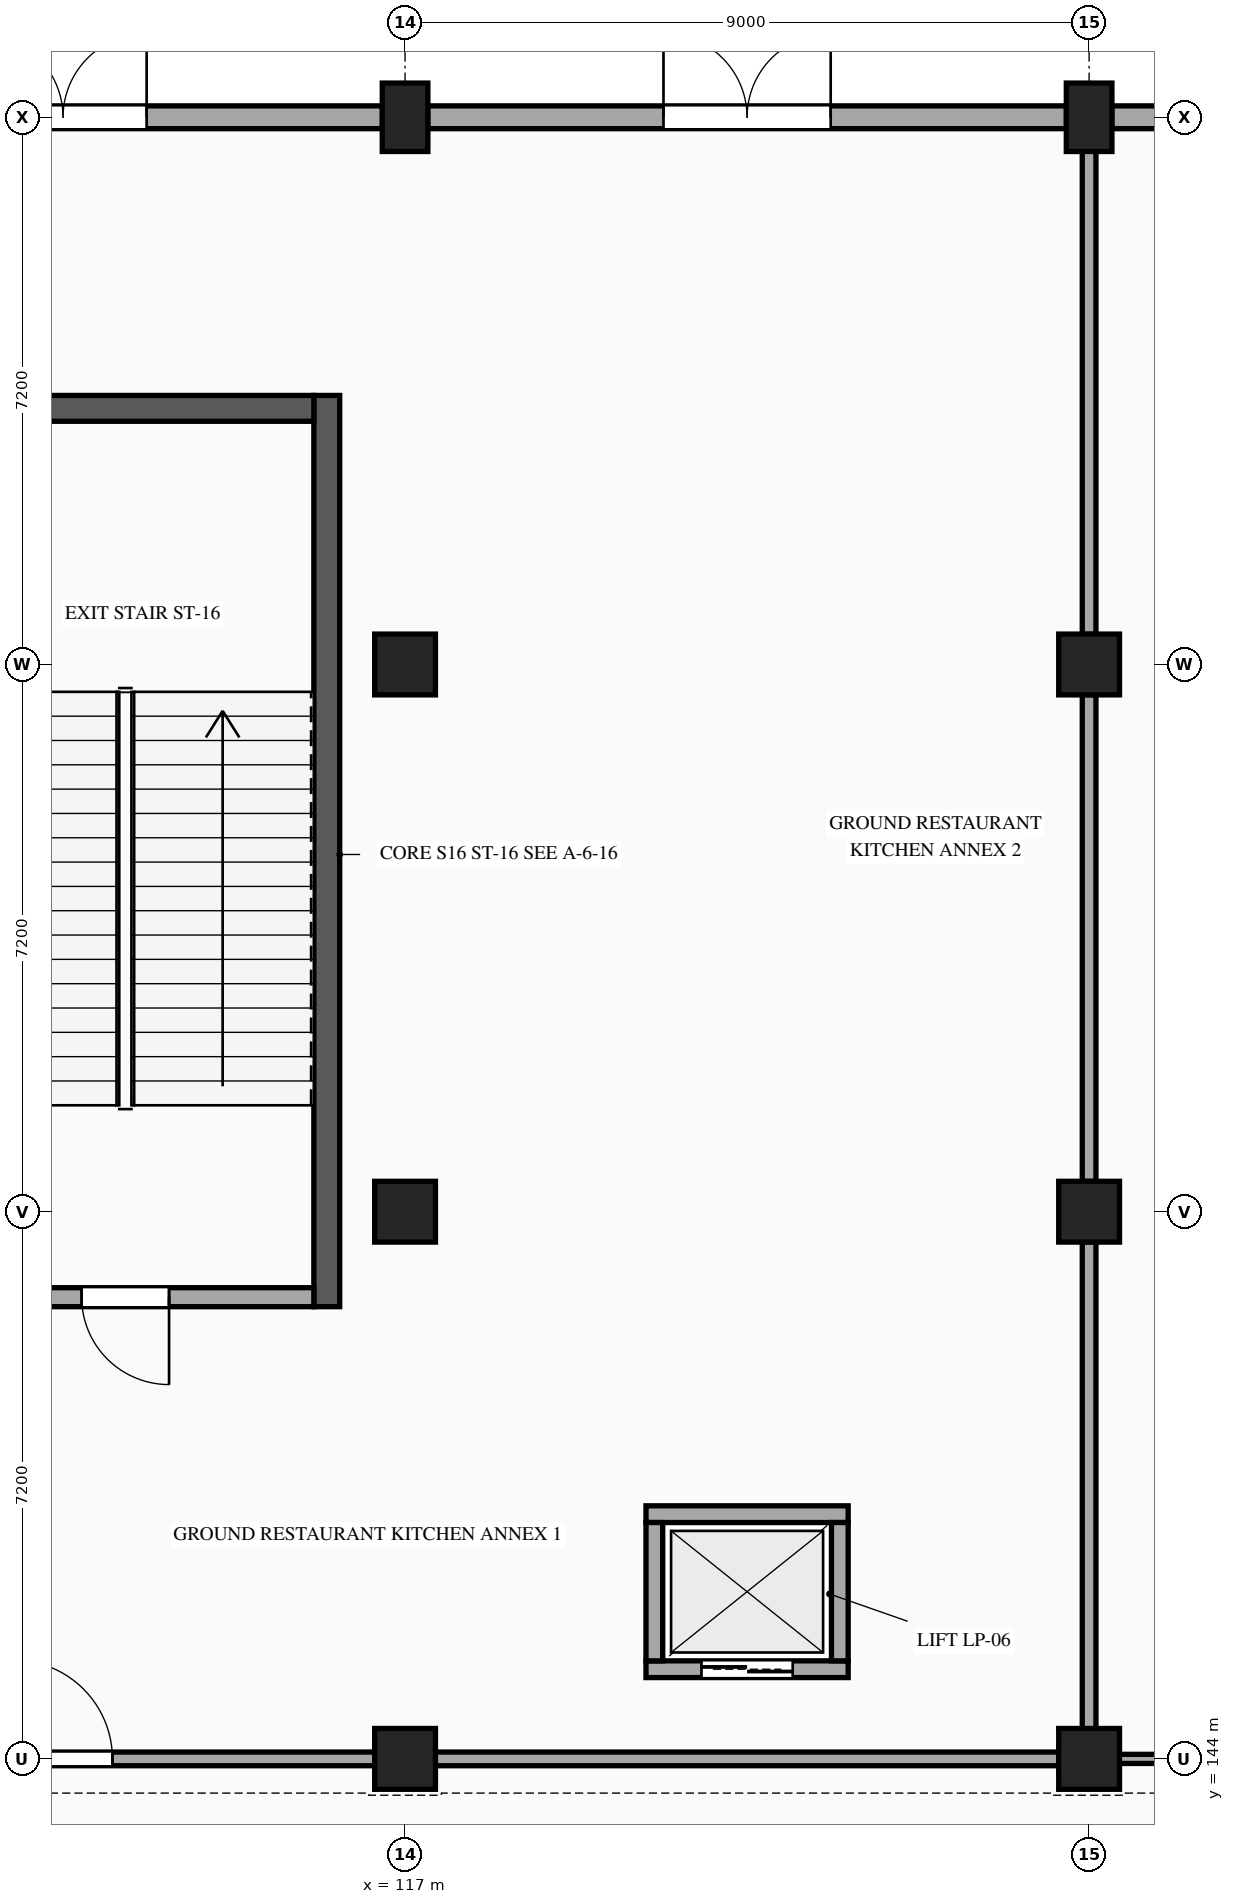
"""IFC4 building model, lengths in metres.
Left out: names, types, materials, properties, quantities, classifications, styles, units other than length and angle.
Written with IfcOpenShell. Run it as: python <this file> out.ifc"""

import sys

from ifc_helpers import new_model, si_unit, direction, frame, frame_2d, origin, origin_2d, place, context, subcontext, project, spatial, rectangle, extrude, element, fill, save


model = new_model("IFC4")
c1 = context("Model", 3, precision=1e-05, world=origin(), true_north=direction((0.0, 1.0)))
c2 = subcontext(c1, "Body", "Model", "MODEL_VIEW")
j1 = project(units=[si_unit("LENGTHUNIT", "METRE"), si_unit("PLANEANGLEUNIT", "RADIAN")], contexts=[c1])
p1 = place(None, origin())
s1 = spatial("IfcSite", under=j1, at=p1, CompositionType="ELEMENT")
p2 = place(p1, origin())
s2 = spatial("IfcBuilding", under=s1, at=p2, CompositionType="ELEMENT")
p3 = place(p2, origin())
s3 = spatial("IfcBuildingStorey", under=s2, at=p3, CompositionType="ELEMENT", Elevation=0.0)
for number, where, z_axis, x_axis in (
    (1, (117.0, 144.0, 0.0), (0.0, 0.0, 1.0), (1.0, 0.0, 0.0)),
    (2, (117.0, 151.2, 0.0), (0.0, 0.0, 1.0), (1.0, 0.0, 0.0)),
    (3, (117.0, 158.4, 0.0), (0.0, 0.0, 1.0), (1.0, 0.0, 0.0)),
):
    element("IfcColumn", number, at=place(p3, frame(where, z_axis=z_axis, x_axis=x_axis)), inside=s3, PredefinedType="COLUMN", context=c2, shape_type="SweptSolid", body=[
        extrude(rectangle(XDim=0.8, YDim=0.8, at=origin_2d()), origin(), (0.0, 0.0, 1.0), 5.4),
    ])
p4 = place(p3, frame((117.0, 165.6, 0.0), z_axis=(0.0, 0.0, 1.0), x_axis=(1.0, 0.0, 0.0)))
e4 = element("IfcColumn", 4, at=p4, inside=s3, PredefinedType="COLUMN", context=c2, shape_type="SweptSolid", body=[
    extrude(rectangle(XDim=0.6, YDim=0.9, at=origin_2d()), origin(), (0.0, 0.0, 1.0), 5.4),
])
for number, where, z_axis, x_axis in (
    (5, (126.0, 144.0, 0.0), (0.0, 0.0, 1.0), (1.0, 0.0, 0.0)),
    (6, (126.0, 151.2, 0.0), (0.0, 0.0, 1.0), (1.0, 0.0, 0.0)),
    (7, (126.0, 158.4, 0.0), (0.0, 0.0, 1.0), (1.0, 0.0, 0.0)),
):
    element("IfcColumn", number, at=place(p3, frame(where, z_axis=z_axis, x_axis=x_axis)), inside=s3, PredefinedType="COLUMN", context=c2, shape_type="SweptSolid", body=[
        extrude(rectangle(XDim=0.8, YDim=0.8, at=origin_2d()), origin(), (0.0, 0.0, 1.0), 5.4),
    ])
p5 = place(p3, frame((126.0, 165.6, 0.0), z_axis=(0.0, 0.0, 1.0), x_axis=(1.0, 0.0, 0.0)))
e8 = element("IfcColumn", 8, at=p5, inside=s3, PredefinedType="COLUMN", context=c2, shape_type="SweptSolid", body=[
    extrude(rectangle(XDim=0.6, YDim=0.9, at=origin_2d()), origin(), (0.0, 0.0, 1.0), 5.4),
])
p6 = place(p3, frame((115.97, 161.94, 0.0), z_axis=(0.0, 0.0, 1.0), x_axis=(0.0, -1.0, 0.0)))
e9 = element("IfcWall", 9, at=p6, inside=s3, PredefinedType="SHEAR", context=c2, shape_type="SweptSolid", body=[
    extrude(rectangle(XDim=11.99, YDim=0.34, at=frame_2d((5.995, 0.0))), origin(), (0.0, 0.0, 1.0), 5.12),
])
p7 = place(p3, frame((110.84, 161.77, 0.0), z_axis=(0.0, 0.0, 1.0), x_axis=(1.0, 0.0, 0.0)))
e10 = element("IfcWall", 10, at=p7, inside=s3, PredefinedType="SHEAR", context=c2, shape_type="SweptSolid", body=[
    extrude(rectangle(XDim=4.96, YDim=0.34, at=frame_2d((2.48, 0.0))), origin(), (0.0, 0.0, 1.0), 5.12),
])
p8 = place(p3, frame((108.298, 165.6, 0.0), z_axis=(0.0, 0.0, 1.0), x_axis=(1.0, 0.0, 0.0)))
e11 = element("IfcWall", 11, at=p8, inside=s3, PredefinedType="STANDARD", context=c2, shape_type="SweptSolid", body=[
    extrude(rectangle(XDim=8.404, YDim=0.3, at=frame_2d((4.202, 0.0))), origin(), (0.0, 0.0, 1.0), 4.747),
])
p9 = place(p8, frame((3.102, 0.0, 0.0)))
e12 = element("IfcOpeningElement", 12, at=p9, cuts=e11, PredefinedType="OPENING", context=c2, shape_type="SweptSolid", body=[
    extrude(rectangle(XDim=2.2, YDim=2.4, at=frame_2d((1.1, 1.2))), frame((0.0, 0.16, 0.0), z_axis=(0.0, -1.0, 0.0), x_axis=(1.0, 0.0, 0.0)), (0.0, 0.0, 1.0), 0.32),
])
p10 = place(p3, frame((117.298, 165.6, 0.0), z_axis=(0.0, 0.0, 1.0), x_axis=(1.0, 0.0, 0.0)))
e13 = element("IfcWall", 13, at=p10, inside=s3, PredefinedType="STANDARD", context=c2, shape_type="SweptSolid", body=[
    extrude(rectangle(XDim=8.404, YDim=0.3, at=frame_2d((4.202, 0.0))), origin(), (0.0, 0.0, 1.0), 4.747),
])
p11 = place(p10, frame((3.102, 0.0, 0.0)))
e14 = element("IfcOpeningElement", 14, at=p11, cuts=e13, PredefinedType="OPENING", context=c2, shape_type="SweptSolid", body=[
    extrude(rectangle(XDim=2.2, YDim=2.4, at=frame_2d((1.1, 1.2))), frame((0.0, 0.16, 0.0), z_axis=(0.0, -1.0, 0.0), x_axis=(1.0, 0.0, 0.0)), (0.0, 0.0, 1.0), 0.32),
])
p12 = place(p3, frame((126.298, 165.6, 0.0), z_axis=(0.0, 0.0, 1.0), x_axis=(1.0, 0.0, 0.0)))
e15 = element("IfcWall", 15, at=p12, inside=s3, PredefinedType="STANDARD", context=c2, shape_type="SweptSolid", body=[
    extrude(rectangle(XDim=8.404, YDim=0.3, at=frame_2d((4.202, 0.0))), origin(), (0.0, 0.0, 1.0), 4.747),
])
p13 = place(p12, frame((3.102, 0.0, 0.0)))
e16 = element("IfcOpeningElement", 16, at=p13, cuts=e15, PredefinedType="OPENING", context=c2, shape_type="SweptSolid", body=[
    extrude(rectangle(XDim=2.2, YDim=2.4, at=frame_2d((1.1, 1.2))), frame((0.0, 0.16, 0.0), z_axis=(0.0, -1.0, 0.0), x_axis=(1.0, 0.0, 0.0)), (0.0, 0.0, 1.0), 0.32),
])
p14 = place(p3, frame((120.17, 145.18, 0.0), z_axis=(0.0, 0.0, 1.0), x_axis=(1.0, 0.0, 0.0)))
e17 = element("IfcWall", 17, at=p14, inside=s3, PredefinedType="STANDARD", context=c2, shape_type="SweptSolid", body=[
    extrude(rectangle(XDim=2.66, YDim=0.22, at=frame_2d((1.33, 0.0))), origin(), (0.0, 0.0, 1.0), 5.08),
])
p15 = place(p14, frame((0.73, 0.0, 0.0)))
e18 = element("IfcOpeningElement", 18, at=p15, cuts=e17, PredefinedType="OPENING", context=c2, shape_type="SweptSolid", body=[
    extrude(rectangle(XDim=1.2, YDim=2.2, at=frame_2d((0.6, 1.1))), frame((0.0, 0.12, 0.0), z_axis=(0.0, -1.0, 0.0), x_axis=(1.0, 0.0, 0.0)), (0.0, 0.0, 1.0), 0.24),
])
p16 = place(p3, frame((122.83, 147.22, 0.0), z_axis=(0.0, 0.0, 1.0), x_axis=(-1.0, 0.0, 0.0)))
e19 = element("IfcWall", 19, at=p16, inside=s3, PredefinedType="STANDARD", context=c2, shape_type="SweptSolid", body=[
    extrude(rectangle(XDim=2.66, YDim=0.22, at=frame_2d((1.33, 0.0))), origin(), (0.0, 0.0, 1.0), 5.08),
])
for number, where, z_axis, x_axis in (
    (20, (120.28, 147.11, 0.0), (0.0, 0.0, 1.0), (0.0, -1.0, 0.0)),
    (21, (122.72, 145.29, 0.0), (0.0, 0.0, 1.0), (0.0, 1.0, 0.0)),
):
    element("IfcWall", number, at=place(p3, frame(where, z_axis=z_axis, x_axis=x_axis)), inside=s3, PredefinedType="STANDARD", context=c2, shape_type="SweptSolid", body=[
        extrude(rectangle(XDim=1.82, YDim=0.22, at=frame_2d((0.91, 0.0))), origin(), (0.0, 0.0, 1.0), 5.08),
    ])
p17 = place(p3, frame((115.8, 150.075, 0.0), z_axis=(0.0, 0.0, 1.0), x_axis=(-1.0, 0.0, 0.0)))
e22 = element("IfcWall", 22, at=p17, inside=s3, PredefinedType="STANDARD", context=c2, shape_type="SweptSolid", body=[
    extrude(rectangle(XDim=4.96, YDim=0.25, at=frame_2d((2.48, 0.0))), origin(), (0.0, 0.0, 1.0), 5.08),
])
p18 = place(p17, frame((1.905, 0.0, 0.0)))
e23 = element("IfcOpeningElement", 23, at=p18, cuts=e22, PredefinedType="OPENING", context=c2, shape_type="SweptSolid", body=[
    extrude(rectangle(XDim=1.15, YDim=2.2, at=frame_2d((0.575, 1.1))), frame((0.0, 0.135, 0.0), z_axis=(0.0, -1.0, 0.0), x_axis=(1.0, 0.0, 0.0)), (0.0, 0.0, 1.0), 0.27),
])
p19 = place(p3, frame((108.398, 144.0, 0.0), z_axis=(0.0, 0.0, 1.0), x_axis=(1.0, 0.0, 0.0)))
e24 = element("IfcWall", 24, at=p19, inside=s3, PredefinedType="PARTITIONING", context=c2, shape_type="SweptSolid", body=[
    extrude(rectangle(XDim=8.204, YDim=0.18, at=frame_2d((4.102, 0.0))), origin(), (0.0, 0.0, 1.0), 4.424),
])
p20 = place(p19, frame((3.452, 0.0, 0.0)))
e25 = element("IfcOpeningElement", 25, at=p20, cuts=e24, PredefinedType="OPENING", context=c2, shape_type="SweptSolid", body=[
    extrude(rectangle(XDim=1.3, YDim=2.2, at=frame_2d((0.65, 1.1))), frame((0.0, 0.1, 0.0), z_axis=(0.0, -1.0, 0.0), x_axis=(1.0, 0.0, 0.0)), (0.0, 0.0, 1.0), 0.2),
])
p21 = place(p3, frame((117.398, 144.0, 0.0), z_axis=(0.0, 0.0, 1.0), x_axis=(1.0, 0.0, 0.0)))
e26 = element("IfcWall", 26, at=p21, inside=s3, PredefinedType="PARTITIONING", context=c2, shape_type="SweptSolid", body=[
    extrude(rectangle(XDim=8.204, YDim=0.18, at=frame_2d((4.102, 0.0))), origin(), (0.0, 0.0, 1.0), 4.424),
])
p22 = place(p3, frame((126.398, 144.0, 0.0), z_axis=(0.0, 0.0, 1.0), x_axis=(1.0, 0.0, 0.0)))
e27 = element("IfcWall", 27, at=p22, inside=s3, PredefinedType="PARTITIONING", context=c2, shape_type="SweptSolid", body=[
    extrude(rectangle(XDim=8.204, YDim=0.12, at=frame_2d((4.102, 0.0))), origin(), (0.0, 0.0, 1.0), 4.424),
])
for number, where, z_axis, x_axis in (
    (28, (126.0, 144.398, 0.0), (0.0, 0.0, 1.0), (0.0, 1.0, 0.0)),
    (29, (126.0, 151.598, 0.0), (0.0, 0.0, 1.0), (0.0, 1.0, 0.0)),
):
    element("IfcWall", number, at=place(p3, frame(where, z_axis=z_axis, x_axis=x_axis)), inside=s3, PredefinedType="PARTITIONING", context=c2, shape_type="SweptSolid", body=[
        extrude(rectangle(XDim=6.404, YDim=0.18, at=frame_2d((3.202, 0.0))), origin(), (0.0, 0.0, 1.0), 4.437),
    ])
p23 = place(p3, frame((126.0, 158.798, 0.0), z_axis=(0.0, 0.0, 1.0), x_axis=(0.0, 1.0, 0.0)))
e30 = element("IfcWall", 30, at=p23, inside=s3, PredefinedType="PARTITIONING", context=c2, shape_type="SweptSolid", body=[
    extrude(rectangle(XDim=6.354, YDim=0.18, at=frame_2d((3.177, 0.0))), origin(), (0.0, 0.0, 1.0), 4.437),
])
p24 = place(p9, origin())
e31 = element("IfcDoor", 31, at=p24, inside=s3, OperationType="DOUBLE_DOOR_SINGLE_SWING", PredefinedType="DOOR", context=c2, shape_type="SweptSolid", body=[
    extrude(rectangle(XDim=2.2, YDim=2.4, at=frame_2d((1.1, 1.2))), frame((0.0, 0.025, 0.0), z_axis=(0.0, -1.0, 0.0), x_axis=(1.0, 0.0, 0.0)), (0.0, 0.0, 1.0), 0.05),
])
fill(e12, e31)
p25 = place(p11, origin())
e32 = element("IfcDoor", 32, at=p25, inside=s3, OperationType="DOUBLE_DOOR_SINGLE_SWING", PredefinedType="DOOR", context=c2, shape_type="SweptSolid", body=[
    extrude(rectangle(XDim=2.2, YDim=2.4, at=frame_2d((1.1, 1.2))), frame((0.0, 0.025, 0.0), z_axis=(0.0, -1.0, 0.0), x_axis=(1.0, 0.0, 0.0)), (0.0, 0.0, 1.0), 0.05),
])
fill(e14, e32)
p26 = place(p15, origin())
e33 = element("IfcDoor", 33, at=p26, inside=s3, OperationType="DOUBLE_DOOR_SLIDING", PredefinedType="DOOR", context=c2, shape_type="SweptSolid", body=[
    extrude(rectangle(XDim=1.2, YDim=2.2, at=frame_2d((0.6, 1.1))), frame((0.0, 0.025, 0.0), z_axis=(0.0, -1.0, 0.0), x_axis=(1.0, 0.0, 0.0)), (0.0, 0.0, 1.0), 0.05),
])
fill(e18, e33)
p27 = place(p18, origin())
e34 = element("IfcDoor", 34, at=p27, inside=s3, OperationType="SINGLE_SWING_LEFT", PredefinedType="DOOR", context=c2, shape_type="SweptSolid", body=[
    extrude(rectangle(XDim=1.15, YDim=2.2, at=frame_2d((0.575, 1.1))), frame((0.0, 0.025, 0.0), z_axis=(0.0, -1.0, 0.0), x_axis=(1.0, 0.0, 0.0)), (0.0, 0.0, 1.0), 0.05),
])
fill(e23, e34)
p28 = place(p20, origin())
e35 = element("IfcDoor", 35, at=p28, inside=s3, OperationType="SINGLE_SWING_LEFT", PredefinedType="DOOR", context=c2, shape_type="SweptSolid", body=[
    extrude(rectangle(XDim=1.3, YDim=2.2, at=frame_2d((0.65, 1.1))), frame((0.0, 0.025, 0.0), z_axis=(0.0, -1.0, 0.0), x_axis=(1.0, 0.0, 0.0)), (0.0, 0.0, 1.0), 0.05),
])
fill(e25, e35)
save(model, sys.argv[1])
